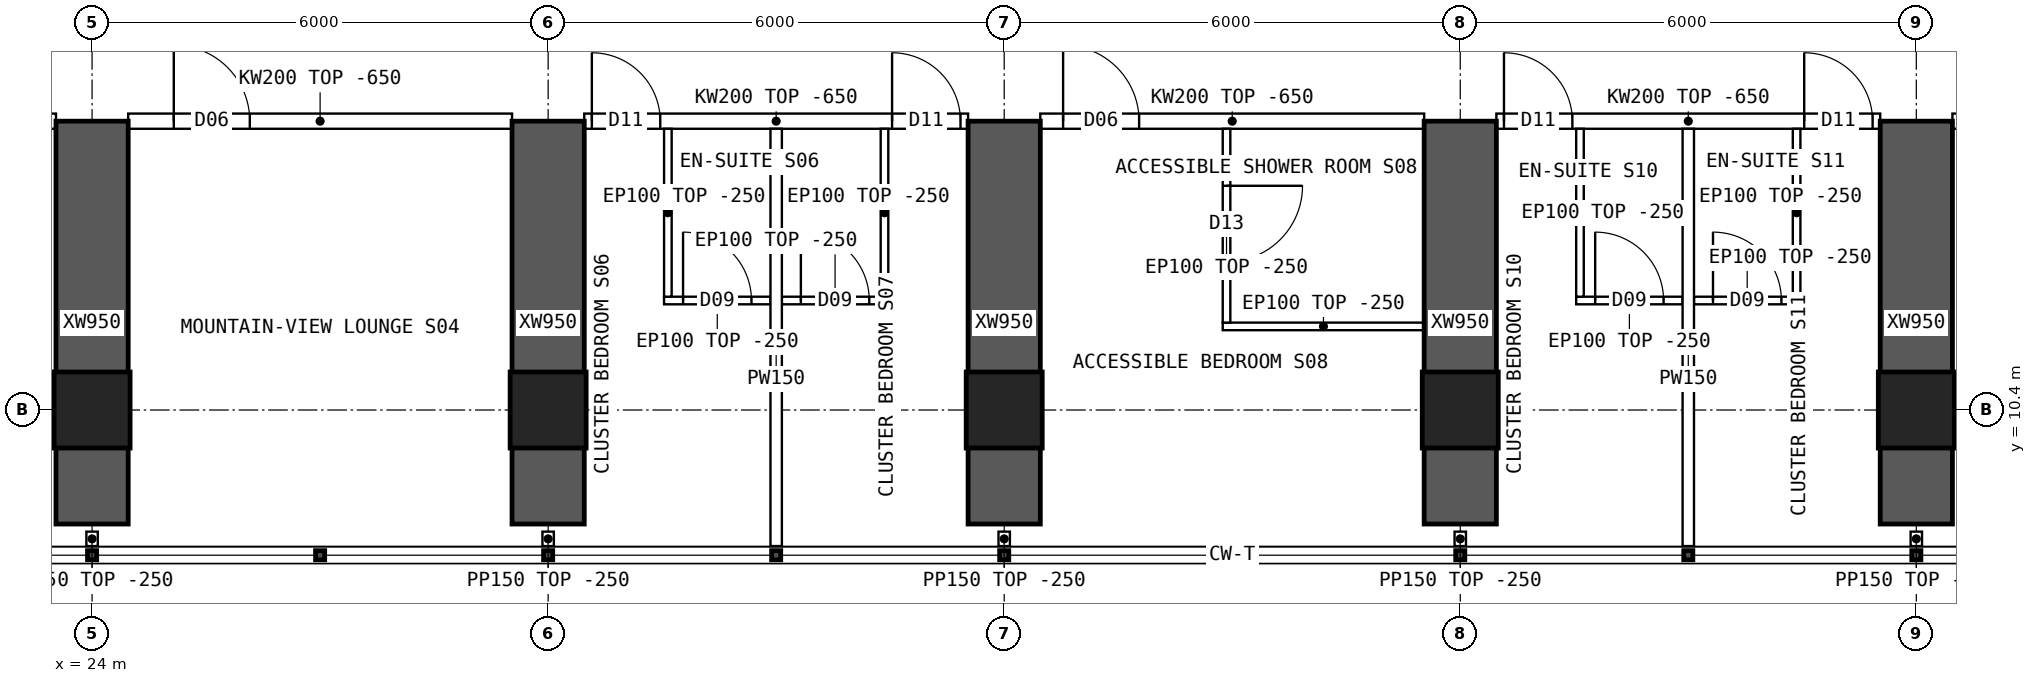
"""IFC4 building model, lengths in metres.
Left out: names, types, materials, properties, quantities, classifications, styles, units other than length and angle.
Written with IfcOpenShell. Run it as: python <this file> out.ifc"""

import sys

from ifc_helpers import new_model, si_unit, direction, frame, frame_2d, origin, origin_2d, place, context, subcontext, project, spatial, polyline, rectangle, hollow_rectangle, outline, extrude, element, fill, save


model = new_model("IFC4")
c1 = context("Model", 3, precision=1e-05, world=origin(), true_north=direction((0.0, 1.0)))
c2 = subcontext(c1, "Body", "Model", "MODEL_VIEW")
j1 = project(units=[si_unit("LENGTHUNIT", "METRE"), si_unit("PLANEANGLEUNIT", "RADIAN")], contexts=[c1])
p1 = place(None, origin())
s1 = spatial("IfcSite", under=j1, at=p1, CompositionType="ELEMENT")
p2 = place(p1, origin())
s2 = spatial("IfcBuilding", under=s1, at=p2, CompositionType="ELEMENT")
p3 = place(p2, frame((0.0, 0.0, 91.9)))
s3 = spatial("IfcBuildingStorey", under=s2, at=p3, CompositionType="ELEMENT", Elevation=91.9)
for number, where, z_axis, x_axis in (
    (1, (24.0, 10.4, 0.0), (0.0, 0.0, 1.0), (1.0, 0.0, 0.0)),
    (2, (30.0, 10.4, 0.0), (0.0, 0.0, 1.0), (1.0, 0.0, 0.0)),
    (3, (36.0, 10.4, 0.0), (0.0, 0.0, 1.0), (1.0, 0.0, 0.0)),
    (4, (42.0, 10.4, 0.0), (0.0, 0.0, 1.0), (1.0, 0.0, 0.0)),
    (5, (48.0, 10.4, 0.0), (0.0, 0.0, 1.0), (1.0, 0.0, 0.0)),
):
    element("IfcColumn", number, at=place(p3, frame(where, z_axis=z_axis, x_axis=x_axis)), inside=s3, PredefinedType="COLUMN", context=c2, shape_type="SweptSolid", body=[
        extrude(hollow_rectangle(XDim=1.0, YDim=1.0, WallThickness=0.1, at=origin_2d()), origin(), (0.0, 0.0, 1.0), 3.75),
    ])
for number, where, z_axis, x_axis in (
    (6, (24.0, 8.9, 0.0), (0.0, 0.0, 1.0), (0.0, 1.0, 0.0)),
    (7, (30.0, 8.9, 0.0), (0.0, 0.0, 1.0), (0.0, 1.0, 0.0)),
    (8, (36.0, 8.9, 0.0), (0.0, 0.0, 1.0), (0.0, 1.0, 0.0)),
    (9, (42.0, 8.9, 0.0), (0.0, 0.0, 1.0), (0.0, 1.0, 0.0)),
    (10, (48.0, 8.9, 0.0), (0.0, 0.0, 1.0), (0.0, 1.0, 0.0)),
):
    element("IfcWall", number, at=place(p3, frame(where, z_axis=z_axis, x_axis=x_axis)), inside=s3, PredefinedType="SHEAR", context=c2, shape_type="SweptSolid", body=[
        extrude(rectangle(XDim=5.3, YDim=0.95, at=frame_2d((2.65, 0.0))), origin(), (0.0, 0.0, 1.0), 3.75),
    ])
p4 = place(p3, frame((18.475, 14.2, 0.0), z_axis=(0.0, 0.0, 1.0), x_axis=(1.0, 0.0, 0.0)))
e11 = element("IfcWall", 11, at=p4, inside=s3, PredefinedType="SOLIDWALL", context=c2, shape_type="SweptSolid", body=[
    extrude(outline(polyline([(0.0, 0.0), (5.05, 0.0), (5.05, 3.1), (0.0, 3.1), (0.0, 0.0)])), frame((0.0, 0.1, 0.0), z_axis=(0.0, -1.0, 0.0), x_axis=(1.0, 0.0, 0.0)), (0.0, 0.0, 1.0), 0.2),
])
p5 = place(p4, frame((0.1, 0.0, 0.0)))
e12 = element("IfcOpeningElement", 12, at=p5, cuts=e11, PredefinedType="OPENING", context=c2, shape_type="SweptSolid", body=[
    extrude(rectangle(XDim=0.9, YDim=2.1, at=frame_2d((0.45, 1.05))), frame((0.0, 0.11, 0.0), z_axis=(0.0, -1.0, 0.0), x_axis=(1.0, 0.0, 0.0)), (0.0, 0.0, 1.0), 0.22),
])
p6 = place(p4, frame((4.05, 0.0, 0.0)))
e13 = element("IfcOpeningElement", 13, at=p6, cuts=e11, PredefinedType="OPENING", context=c2, shape_type="SweptSolid", body=[
    extrude(rectangle(XDim=0.9, YDim=2.1, at=frame_2d((0.45, 1.05))), frame((0.0, 0.11, 0.0), z_axis=(0.0, -1.0, 0.0), x_axis=(1.0, 0.0, 0.0)), (0.0, 0.0, 1.0), 0.22),
])
p7 = place(p3, frame((24.475, 14.2, 0.0), z_axis=(0.0, 0.0, 1.0), x_axis=(1.0, 0.0, 0.0)))
e14 = element("IfcWall", 14, at=p7, inside=s3, PredefinedType="SOLIDWALL", context=c2, shape_type="SweptSolid", body=[
    extrude(outline(polyline([(0.0, 0.0), (5.05, 0.0), (5.05, 3.1), (0.0, 3.1), (0.0, 0.0)])), frame((0.0, 0.1, 0.0), z_axis=(0.0, -1.0, 0.0), x_axis=(1.0, 0.0, 0.0)), (0.0, 0.0, 1.0), 0.2),
])
p8 = place(p7, frame((0.6, 0.0, 0.0)))
e15 = element("IfcOpeningElement", 15, at=p8, cuts=e14, PredefinedType="OPENING", context=c2, shape_type="SweptSolid", body=[
    extrude(rectangle(XDim=1.0, YDim=2.1, at=frame_2d((0.5, 1.05))), frame((0.0, 0.11, 0.0), z_axis=(0.0, -1.0, 0.0), x_axis=(1.0, 0.0, 0.0)), (0.0, 0.0, 1.0), 0.22),
])
p9 = place(p3, frame((30.475, 14.2, 0.0), z_axis=(0.0, 0.0, 1.0), x_axis=(1.0, 0.0, 0.0)))
e16 = element("IfcWall", 16, at=p9, inside=s3, PredefinedType="SOLIDWALL", context=c2, shape_type="SweptSolid", body=[
    extrude(outline(polyline([(0.0, 0.0), (5.05, 0.0), (5.05, 3.1), (0.0, 3.1), (0.0, 0.0)])), frame((0.0, 0.1, 0.0), z_axis=(0.0, -1.0, 0.0), x_axis=(1.0, 0.0, 0.0)), (0.0, 0.0, 1.0), 0.2),
])
p10 = place(p9, frame((0.1, 0.0, 0.0)))
e17 = element("IfcOpeningElement", 17, at=p10, cuts=e16, PredefinedType="OPENING", context=c2, shape_type="SweptSolid", body=[
    extrude(rectangle(XDim=0.9, YDim=2.1, at=frame_2d((0.45, 1.05))), frame((0.0, 0.11, 0.0), z_axis=(0.0, -1.0, 0.0), x_axis=(1.0, 0.0, 0.0)), (0.0, 0.0, 1.0), 0.22),
])
p11 = place(p9, frame((4.05, 0.0, 0.0)))
e18 = element("IfcOpeningElement", 18, at=p11, cuts=e16, PredefinedType="OPENING", context=c2, shape_type="SweptSolid", body=[
    extrude(rectangle(XDim=0.9, YDim=2.1, at=frame_2d((0.45, 1.05))), frame((0.0, 0.11, 0.0), z_axis=(0.0, -1.0, 0.0), x_axis=(1.0, 0.0, 0.0)), (0.0, 0.0, 1.0), 0.22),
])
p12 = place(p3, frame((36.475, 14.2, 0.0), z_axis=(0.0, 0.0, 1.0), x_axis=(1.0, 0.0, 0.0)))
e19 = element("IfcWall", 19, at=p12, inside=s3, PredefinedType="SOLIDWALL", context=c2, shape_type="SweptSolid", body=[
    extrude(outline(polyline([(0.0, 0.0), (5.05, 0.0), (5.05, 3.1), (0.0, 3.1), (0.0, 0.0)])), frame((0.0, 0.1, 0.0), z_axis=(0.0, -1.0, 0.0), x_axis=(1.0, 0.0, 0.0)), (0.0, 0.0, 1.0), 0.2),
])
p13 = place(p12, frame((0.3, 0.0, 0.0)))
e20 = element("IfcOpeningElement", 20, at=p13, cuts=e19, PredefinedType="OPENING", context=c2, shape_type="SweptSolid", body=[
    extrude(rectangle(XDim=1.0, YDim=2.1, at=frame_2d((0.5, 1.05))), frame((0.0, 0.11, 0.0), z_axis=(0.0, -1.0, 0.0), x_axis=(1.0, 0.0, 0.0)), (0.0, 0.0, 1.0), 0.22),
])
p14 = place(p3, frame((42.475, 14.2, 0.0), z_axis=(0.0, 0.0, 1.0), x_axis=(1.0, 0.0, 0.0)))
e21 = element("IfcWall", 21, at=p14, inside=s3, PredefinedType="SOLIDWALL", context=c2, shape_type="SweptSolid", body=[
    extrude(outline(polyline([(0.0, 0.0), (5.05, 0.0), (5.05, 3.1), (0.0, 3.1), (0.0, 0.0)])), frame((0.0, 0.1, 0.0), z_axis=(0.0, -1.0, 0.0), x_axis=(1.0, 0.0, 0.0)), (0.0, 0.0, 1.0), 0.2),
])
p15 = place(p14, frame((0.1, 0.0, 0.0)))
e22 = element("IfcOpeningElement", 22, at=p15, cuts=e21, PredefinedType="OPENING", context=c2, shape_type="SweptSolid", body=[
    extrude(rectangle(XDim=0.9, YDim=2.1, at=frame_2d((0.45, 1.05))), frame((0.0, 0.11, 0.0), z_axis=(0.0, -1.0, 0.0), x_axis=(1.0, 0.0, 0.0)), (0.0, 0.0, 1.0), 0.22),
])
p16 = place(p14, frame((4.05, 0.0, 0.0)))
e23 = element("IfcOpeningElement", 23, at=p16, cuts=e21, PredefinedType="OPENING", context=c2, shape_type="SweptSolid", body=[
    extrude(rectangle(XDim=0.9, YDim=2.1, at=frame_2d((0.45, 1.05))), frame((0.0, 0.11, 0.0), z_axis=(0.0, -1.0, 0.0), x_axis=(1.0, 0.0, 0.0)), (0.0, 0.0, 1.0), 0.22),
])
p17 = place(p3, frame((48.475, 14.2, 0.0), z_axis=(0.0, 0.0, 1.0), x_axis=(1.0, 0.0, 0.0)))
e24 = element("IfcWall", 24, at=p17, inside=s3, PredefinedType="SOLIDWALL", context=c2, shape_type="SweptSolid", body=[
    extrude(outline(polyline([(0.0, 0.0), (5.05, 0.0), (5.05, 3.1), (0.0, 3.1), (0.0, 0.0)])), frame((0.0, 0.1, 0.0), z_axis=(0.0, -1.0, 0.0), x_axis=(1.0, 0.0, 0.0)), (0.0, 0.0, 1.0), 0.2),
])
p18 = place(p17, frame((0.6, 0.0, 0.0)))
e25 = element("IfcOpeningElement", 25, at=p18, cuts=e24, PredefinedType="OPENING", context=c2, shape_type="SweptSolid", body=[
    extrude(rectangle(XDim=1.0, YDim=2.1, at=frame_2d((0.5, 1.05))), frame((0.0, 0.11, 0.0), z_axis=(0.0, -1.0, 0.0), x_axis=(1.0, 0.0, 0.0)), (0.0, 0.0, 1.0), 0.22),
])
p19 = place(p3, frame((33.0, 8.61, 0.0), z_axis=(0.0, 0.0, 1.0), x_axis=(0.0, 1.0, 0.0)))
e26 = element("IfcWall", 26, at=p19, inside=s3, PredefinedType="PARTITIONING", context=c2, shape_type="SweptSolid", body=[
    extrude(outline(polyline([(0.0, 0.0), (5.49, 0.0), (5.49, 3.1), (5.442, 3.1), (5.44, 3.5), (1.992, 3.5), (1.99, 3.1), (1.592, 3.1), (1.59, 3.5), (0.0, 3.5), (0.0, 0.0)])), frame((0.0, 0.075, 0.0), z_axis=(0.0, -1.0, 0.0), x_axis=(1.0, 0.0, 0.0)), (0.0, 0.0, 1.0), 0.15),
])
p20 = place(p3, frame((32.925, 11.841, 0.0), z_axis=(0.0, 0.0, 1.0), x_axis=(-1.0, 0.0, 0.0)))
e27 = element("IfcWall", 27, at=p20, inside=s3, PredefinedType="PARTITIONING", context=c2, shape_type="SweptSolid", body=[
    extrude(rectangle(XDim=1.4, YDim=0.1, at=frame_2d((0.7, 0.0))), origin(), (0.0, 0.0, 1.0), 3.5),
])
p21 = place(p20, frame((0.25, 0.0, 0.0)))
e28 = element("IfcOpeningElement", 28, at=p21, cuts=e27, PredefinedType="OPENING", context=c2, shape_type="SweptSolid", body=[
    extrude(rectangle(XDim=0.9, YDim=2.1, at=frame_2d((0.45, 1.05))), frame((0.0, 0.06, 0.0), z_axis=(0.0, -1.0, 0.0), x_axis=(1.0, 0.0, 0.0)), (0.0, 0.0, 1.0), 0.12),
])
p22 = place(p3, frame((31.575, 11.891, 0.0), z_axis=(0.0, 0.0, 1.0), x_axis=(0.0, 1.0, 0.0)))
e29 = element("IfcWall", 29, at=p22, inside=s3, PredefinedType="PARTITIONING", context=c2, shape_type="SweptSolid", body=[
    extrude(outline(polyline([(0.0, 0.0), (2.209, 0.0), (2.209, 3.1), (2.161, 3.1), (2.159, 3.5), (0.0, 3.5), (0.0, 0.0)])), frame((0.0, 0.05, 0.0), z_axis=(0.0, -1.0, 0.0), x_axis=(1.0, 0.0, 0.0)), (0.0, 0.0, 1.0), 0.1),
])
p23 = place(p3, frame((34.475, 11.841, 0.0), z_axis=(0.0, 0.0, 1.0), x_axis=(-1.0, 0.0, 0.0)))
e30 = element("IfcWall", 30, at=p23, inside=s3, PredefinedType="PARTITIONING", context=c2, shape_type="SweptSolid", body=[
    extrude(rectangle(XDim=1.4, YDim=0.1, at=frame_2d((0.7, 0.0))), origin(), (0.0, 0.0, 1.0), 3.5),
])
p24 = place(p23, frame((0.25, 0.0, 0.0)))
e31 = element("IfcOpeningElement", 31, at=p24, cuts=e30, PredefinedType="OPENING", context=c2, shape_type="SweptSolid", body=[
    extrude(rectangle(XDim=0.9, YDim=2.1, at=frame_2d((0.45, 1.05))), frame((0.0, 0.06, 0.0), z_axis=(0.0, -1.0, 0.0), x_axis=(1.0, 0.0, 0.0)), (0.0, 0.0, 1.0), 0.12),
])
p25 = place(p3, frame((34.425, 11.891, 0.0), z_axis=(0.0, 0.0, 1.0), x_axis=(0.0, 1.0, 0.0)))
e32 = element("IfcWall", 32, at=p25, inside=s3, PredefinedType="PARTITIONING", context=c2, shape_type="SweptSolid", body=[
    extrude(outline(polyline([(0.0, 0.0), (2.209, 0.0), (2.209, 3.1), (2.161, 3.1), (2.159, 3.5), (0.0, 3.5), (0.0, 0.0)])), frame((0.0, 0.05, 0.0), z_axis=(0.0, -1.0, 0.0), x_axis=(1.0, 0.0, 0.0)), (0.0, 0.0, 1.0), 0.1),
])
p26 = place(p3, frame((38.875, 11.5, 0.0), z_axis=(0.0, 0.0, 1.0), x_axis=(1.0, 0.0, 0.0)))
e33 = element("IfcWall", 33, at=p26, inside=s3, PredefinedType="PARTITIONING", context=c2, shape_type="SweptSolid", body=[
    extrude(rectangle(XDim=2.65, YDim=0.1, at=frame_2d((1.325, 0.0))), origin(), (0.0, 0.0, 1.0), 3.5),
])
p27 = place(p3, frame((38.925, 11.55, 0.0), z_axis=(0.0, 0.0, 1.0), x_axis=(0.0, 1.0, 0.0)))
e34 = element("IfcWall", 34, at=p27, inside=s3, PredefinedType="PARTITIONING", context=c2, shape_type="SweptSolid", body=[
    extrude(outline(polyline([(0.0, 0.0), (2.55, 0.0), (2.55, 3.1), (2.502, 3.1), (2.5, 3.5), (0.0, 3.5), (0.0, 0.0)])), frame((0.0, 0.05, 0.0), z_axis=(0.0, -1.0, 0.0), x_axis=(1.0, 0.0, 0.0)), (0.0, 0.0, 1.0), 0.1),
])
p28 = place(p27, frame((0.8, 0.0, 0.0)))
e35 = element("IfcOpeningElement", 35, at=p28, cuts=e34, PredefinedType="OPENING", context=c2, shape_type="SweptSolid", body=[
    extrude(rectangle(XDim=1.0, YDim=2.1, at=frame_2d((0.5, 1.05))), frame((0.0, 0.06, 0.0), z_axis=(0.0, -1.0, 0.0), x_axis=(1.0, 0.0, 0.0)), (0.0, 0.0, 1.0), 0.12),
])
p29 = place(p3, frame((45.0, 8.61, 0.0), z_axis=(0.0, 0.0, 1.0), x_axis=(0.0, 1.0, 0.0)))
e36 = element("IfcWall", 36, at=p29, inside=s3, PredefinedType="PARTITIONING", context=c2, shape_type="SweptSolid", body=[
    extrude(outline(polyline([(0.0, 0.0), (5.49, 0.0), (5.49, 3.1), (5.442, 3.1), (5.44, 3.5), (1.992, 3.5), (1.99, 3.1), (1.592, 3.1), (1.59, 3.5), (0.0, 3.5), (0.0, 0.0)])), frame((0.0, 0.075, 0.0), z_axis=(0.0, -1.0, 0.0), x_axis=(1.0, 0.0, 0.0)), (0.0, 0.0, 1.0), 0.15),
])
p30 = place(p3, frame((44.925, 11.841, 0.0), z_axis=(0.0, 0.0, 1.0), x_axis=(-1.0, 0.0, 0.0)))
e37 = element("IfcWall", 37, at=p30, inside=s3, PredefinedType="PARTITIONING", context=c2, shape_type="SweptSolid", body=[
    extrude(rectangle(XDim=1.4, YDim=0.1, at=frame_2d((0.7, 0.0))), origin(), (0.0, 0.0, 1.0), 3.5),
])
p31 = place(p30, frame((0.25, 0.0, 0.0)))
e38 = element("IfcOpeningElement", 38, at=p31, cuts=e37, PredefinedType="OPENING", context=c2, shape_type="SweptSolid", body=[
    extrude(rectangle(XDim=0.9, YDim=2.1, at=frame_2d((0.45, 1.05))), frame((0.0, 0.06, 0.0), z_axis=(0.0, -1.0, 0.0), x_axis=(1.0, 0.0, 0.0)), (0.0, 0.0, 1.0), 0.12),
])
p32 = place(p3, frame((43.575, 11.891, 0.0), z_axis=(0.0, 0.0, 1.0), x_axis=(0.0, 1.0, 0.0)))
e39 = element("IfcWall", 39, at=p32, inside=s3, PredefinedType="PARTITIONING", context=c2, shape_type="SweptSolid", body=[
    extrude(outline(polyline([(0.0, 0.0), (2.209, 0.0), (2.209, 3.1), (2.161, 3.1), (2.159, 3.5), (0.0, 3.5), (0.0, 0.0)])), frame((0.0, 0.05, 0.0), z_axis=(0.0, -1.0, 0.0), x_axis=(1.0, 0.0, 0.0)), (0.0, 0.0, 1.0), 0.1),
])
p33 = place(p3, frame((46.475, 11.841, 0.0), z_axis=(0.0, 0.0, 1.0), x_axis=(-1.0, 0.0, 0.0)))
e40 = element("IfcWall", 40, at=p33, inside=s3, PredefinedType="PARTITIONING", context=c2, shape_type="SweptSolid", body=[
    extrude(rectangle(XDim=1.4, YDim=0.1, at=frame_2d((0.7, 0.0))), origin(), (0.0, 0.0, 1.0), 3.5),
])
p34 = place(p33, frame((0.25, 0.0, 0.0)))
e41 = element("IfcOpeningElement", 41, at=p34, cuts=e40, PredefinedType="OPENING", context=c2, shape_type="SweptSolid", body=[
    extrude(rectangle(XDim=0.9, YDim=2.1, at=frame_2d((0.45, 1.05))), frame((0.0, 0.06, 0.0), z_axis=(0.0, -1.0, 0.0), x_axis=(1.0, 0.0, 0.0)), (0.0, 0.0, 1.0), 0.12),
])
p35 = place(p3, frame((46.425, 11.891, 0.0), z_axis=(0.0, 0.0, 1.0), x_axis=(0.0, 1.0, 0.0)))
e42 = element("IfcWall", 42, at=p35, inside=s3, PredefinedType="PARTITIONING", context=c2, shape_type="SweptSolid", body=[
    extrude(outline(polyline([(0.0, 0.0), (2.209, 0.0), (2.209, 3.1), (2.161, 3.1), (2.159, 3.5), (0.0, 3.5), (0.0, 0.0)])), frame((0.0, 0.05, 0.0), z_axis=(0.0, -1.0, 0.0), x_axis=(1.0, 0.0, 0.0)), (0.0, 0.0, 1.0), 0.1),
])
for number, where, z_axis, x_axis in (
    (43, (24.0, 8.8, 0.0), (0.0, 0.0, 1.0), (0.0, -1.0, 0.0)),
    (44, (30.0, 8.8, 0.0), (0.0, 0.0, 1.0), (0.0, -1.0, 0.0)),
    (45, (36.0, 8.8, 0.0), (0.0, 0.0, 1.0), (0.0, -1.0, 0.0)),
    (46, (42.0, 8.8, 0.0), (0.0, 0.0, 1.0), (0.0, -1.0, 0.0)),
    (47, (48.0, 8.8, 0.0), (0.0, 0.0, 1.0), (0.0, -1.0, 0.0)),
):
    element("IfcWall", number, at=place(p3, frame(where, z_axis=z_axis, x_axis=x_axis)), inside=s3, PredefinedType="PARTITIONING", context=c2, shape_type="SweptSolid", body=[
        extrude(rectangle(XDim=0.19, YDim=0.15, at=frame_2d((0.095, 0.0))), origin(), (0.0, 0.0, 1.0), 3.5),
    ])
p36 = place(p8, origin())
e48 = element("IfcDoor", 48, at=p36, inside=s3, OperationType="SINGLE_SWING_LEFT", PredefinedType="DOOR", context=c2, shape_type="SweptSolid", body=[
    extrude(rectangle(XDim=1.0, YDim=2.1, at=frame_2d((0.5, 1.05))), frame((0.0, 0.025, 0.0), z_axis=(0.0, -1.0, 0.0), x_axis=(1.0, 0.0, 0.0)), (0.0, 0.0, 1.0), 0.05),
])
fill(e15, e48)
p37 = place(p21, origin())
e49 = element("IfcDoor", 49, at=p37, inside=s3, OperationType="SINGLE_SWING_RIGHT", PredefinedType="DOOR", context=c2, shape_type="SweptSolid", body=[
    extrude(rectangle(XDim=0.9, YDim=2.1, at=frame_2d((0.45, 1.05))), frame((0.0, 0.025, 0.0), z_axis=(0.0, -1.0, 0.0), x_axis=(1.0, 0.0, 0.0)), (0.0, 0.0, 1.0), 0.05),
])
fill(e28, e49)
p38 = place(p10, origin())
e50 = element("IfcDoor", 50, at=p38, inside=s3, OperationType="SINGLE_SWING_LEFT", PredefinedType="DOOR", context=c2, shape_type="SweptSolid", body=[
    extrude(rectangle(XDim=0.9, YDim=2.1, at=frame_2d((0.45, 1.05))), frame((0.0, 0.025, 0.0), z_axis=(0.0, -1.0, 0.0), x_axis=(1.0, 0.0, 0.0)), (0.0, 0.0, 1.0), 0.05),
])
fill(e17, e50)
p39 = place(p24, origin())
e51 = element("IfcDoor", 51, at=p39, inside=s3, OperationType="SINGLE_SWING_RIGHT", PredefinedType="DOOR", context=c2, shape_type="SweptSolid", body=[
    extrude(rectangle(XDim=0.9, YDim=2.1, at=frame_2d((0.45, 1.05))), frame((0.0, 0.025, 0.0), z_axis=(0.0, -1.0, 0.0), x_axis=(1.0, 0.0, 0.0)), (0.0, 0.0, 1.0), 0.05),
])
fill(e31, e51)
p40 = place(p11, origin())
e52 = element("IfcDoor", 52, at=p40, inside=s3, OperationType="SINGLE_SWING_LEFT", PredefinedType="DOOR", context=c2, shape_type="SweptSolid", body=[
    extrude(rectangle(XDim=0.9, YDim=2.1, at=frame_2d((0.45, 1.05))), frame((0.0, 0.025, 0.0), z_axis=(0.0, -1.0, 0.0), x_axis=(1.0, 0.0, 0.0)), (0.0, 0.0, 1.0), 0.05),
])
fill(e18, e52)
p41 = place(p28, origin())
e53 = element("IfcDoor", 53, at=p41, inside=s3, OperationType="SINGLE_SWING_RIGHT", PredefinedType="DOOR", context=c2, shape_type="SweptSolid", body=[
    extrude(rectangle(XDim=1.0, YDim=2.1, at=frame_2d((0.5, 1.05))), frame((0.0, 0.025, 0.0), z_axis=(0.0, -1.0, 0.0), x_axis=(1.0, 0.0, 0.0)), (0.0, 0.0, 1.0), 0.05),
])
fill(e35, e53)
p42 = place(p13, origin())
e54 = element("IfcDoor", 54, at=p42, inside=s3, OperationType="SINGLE_SWING_LEFT", PredefinedType="DOOR", context=c2, shape_type="SweptSolid", body=[
    extrude(rectangle(XDim=1.0, YDim=2.1, at=frame_2d((0.5, 1.05))), frame((0.0, 0.025, 0.0), z_axis=(0.0, -1.0, 0.0), x_axis=(1.0, 0.0, 0.0)), (0.0, 0.0, 1.0), 0.05),
])
fill(e20, e54)
p43 = place(p31, origin())
e55 = element("IfcDoor", 55, at=p43, inside=s3, OperationType="SINGLE_SWING_RIGHT", PredefinedType="DOOR", context=c2, shape_type="SweptSolid", body=[
    extrude(rectangle(XDim=0.9, YDim=2.1, at=frame_2d((0.45, 1.05))), frame((0.0, 0.025, 0.0), z_axis=(0.0, -1.0, 0.0), x_axis=(1.0, 0.0, 0.0)), (0.0, 0.0, 1.0), 0.05),
])
fill(e38, e55)
p44 = place(p15, origin())
e56 = element("IfcDoor", 56, at=p44, inside=s3, OperationType="SINGLE_SWING_LEFT", PredefinedType="DOOR", context=c2, shape_type="SweptSolid", body=[
    extrude(rectangle(XDim=0.9, YDim=2.1, at=frame_2d((0.45, 1.05))), frame((0.0, 0.025, 0.0), z_axis=(0.0, -1.0, 0.0), x_axis=(1.0, 0.0, 0.0)), (0.0, 0.0, 1.0), 0.05),
])
fill(e22, e56)
p45 = place(p34, origin())
e57 = element("IfcDoor", 57, at=p45, inside=s3, OperationType="SINGLE_SWING_RIGHT", PredefinedType="DOOR", context=c2, shape_type="SweptSolid", body=[
    extrude(rectangle(XDim=0.9, YDim=2.1, at=frame_2d((0.45, 1.05))), frame((0.0, 0.025, 0.0), z_axis=(0.0, -1.0, 0.0), x_axis=(1.0, 0.0, 0.0)), (0.0, 0.0, 1.0), 0.05),
])
fill(e41, e57)
p46 = place(p16, origin())
e58 = element("IfcDoor", 58, at=p46, inside=s3, OperationType="SINGLE_SWING_LEFT", PredefinedType="DOOR", context=c2, shape_type="SweptSolid", body=[
    extrude(rectangle(XDim=0.9, YDim=2.1, at=frame_2d((0.45, 1.05))), frame((0.0, 0.025, 0.0), z_axis=(0.0, -1.0, 0.0), x_axis=(1.0, 0.0, 0.0)), (0.0, 0.0, 1.0), 0.05),
])
fill(e23, e58)
save(model, sys.argv[1])
